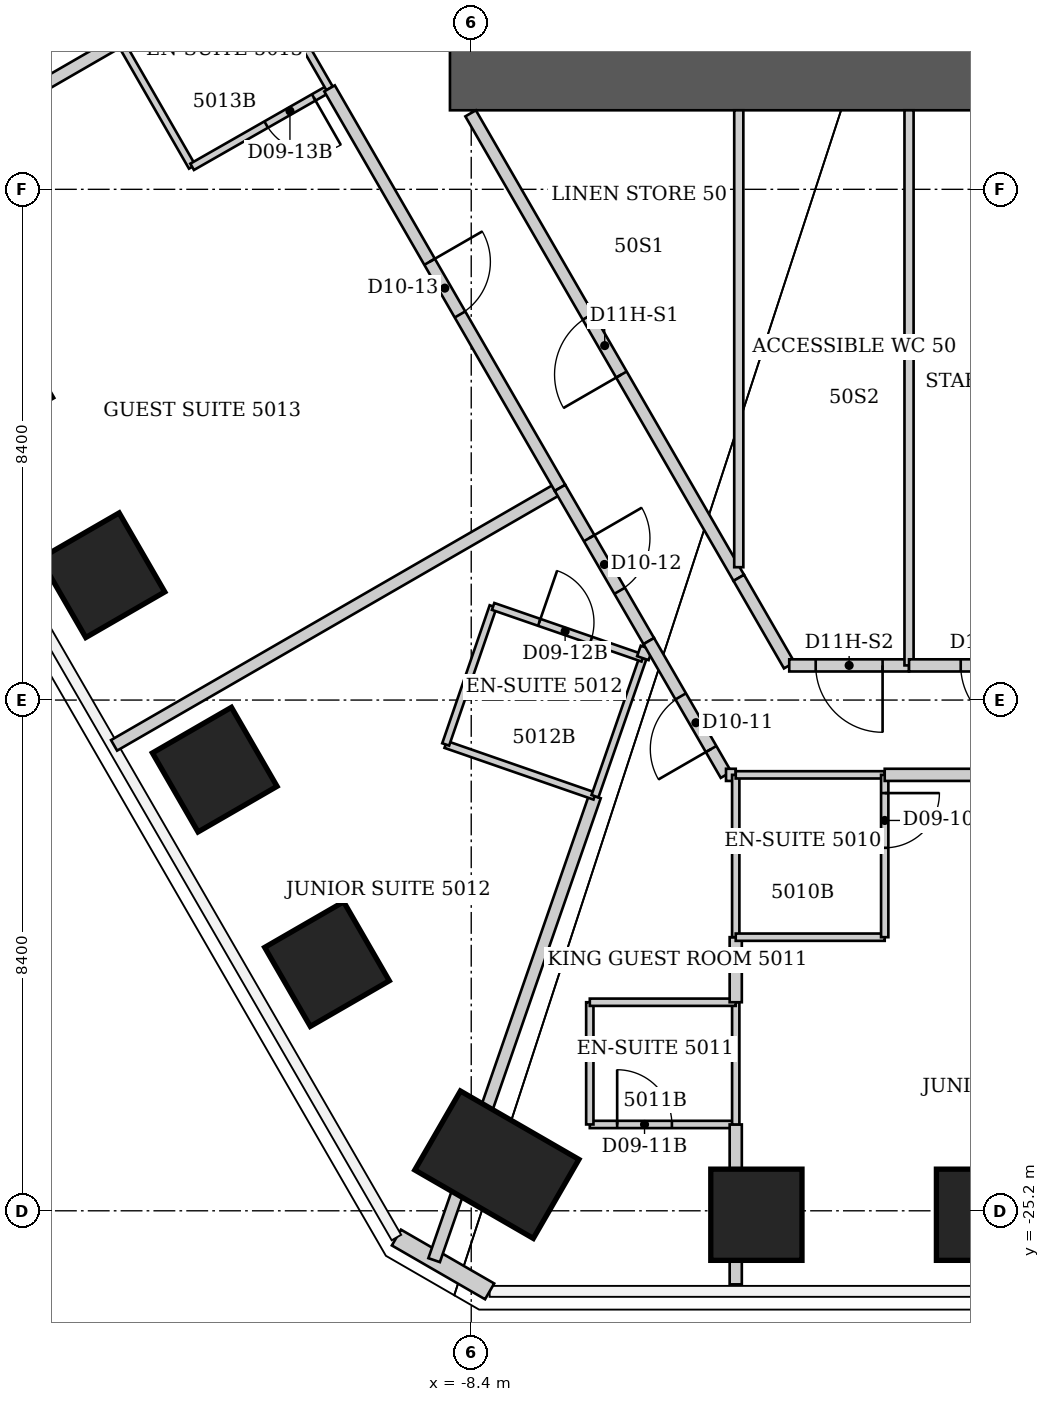
"""IFC4 building model, lengths in metres.
Left out: names, types, materials, properties, quantities, classifications, styles, units other than length and angle.
Written with IfcOpenShell. Run it as: python <this file> out.ifc"""

import sys

from ifc_helpers import new_model, si_unit, direction, frame, frame_2d, origin, origin_2d, place, context, subcontext, project, spatial, rectangle, extrude, element, fill, save


model = new_model("IFC4")
c1 = context("Model", 3, precision=1e-05, world=origin(), true_north=direction((0.0, 1.0)))
c2 = subcontext(c1, "Body", "Model", "MODEL_VIEW")
j1 = project(units=[si_unit("LENGTHUNIT", "METRE"), si_unit("PLANEANGLEUNIT", "RADIAN")], contexts=[c1])
p1 = place(None, origin())
s1 = spatial("IfcSite", under=j1, at=p1, CompositionType="ELEMENT")
p2 = place(p1, origin())
s2 = spatial("IfcBuilding", under=s1, at=p2, CompositionType="ELEMENT")
p3 = place(p2, frame((0.0, 0.0, 202.2)))
s3 = spatial("IfcBuildingStorey", under=s2, at=p3, CompositionType="ELEMENT", Elevation=202.2)
for number, where, z_axis, x_axis in (
    (1, (0.0, -25.265, 0.0), (0.0, 0.0, 1.0), (0.0, -1.0, 0.0)),
    (2, (-3.71, -25.265, 0.0), (0.0, 0.0, 1.0), (0.0, -1.0, 0.0)),
):
    element("IfcColumn", number, at=place(p3, frame(where, z_axis=z_axis, x_axis=x_axis)), inside=s3, PredefinedType="COLUMN", context=c2, shape_type="SweptSolid", body=[
        extrude(rectangle(XDim=1.5, YDim=1.5, at=origin_2d()), origin(), (0.0, 0.0, 1.0), 3.8),
    ])
p4 = place(p3, frame((-7.979, -24.442, 0.0), z_axis=(0.0, 0.0, 1.0), x_axis=(-0.5, -0.866025403784, 0.0)))
e3 = element("IfcColumn", 3, at=p4, inside=s3, PredefinedType="COLUMN", context=c2, shape_type="SweptSolid", body=[
    extrude(rectangle(XDim=1.5, YDim=2.25, at=origin_2d()), origin(), (0.0, 0.0, 1.0), 3.8),
])
for number, where, z_axis, x_axis in (
    (4, (-10.772, -21.142, 0.0), (0.0, 0.0, 1.0), (-0.866, -0.5, 0.0)),
    (5, (-12.618, -17.945, 0.0), (0.0, 0.0, 1.0), (-0.866, -0.5, 0.0)),
    (6, (-14.465, -14.747, 0.0), (0.0, 0.0, 1.0), (-0.866, -0.5, 0.0)),
    (7, (-16.311, -11.549, 0.0), (0.0, 0.0, 1.0), (-0.866, -0.5, 0.0)),
):
    element("IfcColumn", number, at=place(p3, frame(where, z_axis=z_axis, x_axis=x_axis)), inside=s3, PredefinedType="COLUMN", context=c2, shape_type="SweptSolid", body=[
        extrude(rectangle(XDim=1.5, YDim=1.5, at=origin_2d()), origin(), (0.0, 0.0, 1.0), 3.8),
    ])
p5 = place(p3, frame((-8.75, -6.6, 0.0), z_axis=(0.0, 0.0, 1.0), x_axis=(1.0, 0.0, 0.0)))
e8 = element("IfcWall", 8, at=p5, inside=s3, PredefinedType="SHEAR", context=c2, shape_type="SweptSolid", body=[
    extrude(rectangle(XDim=17.5, YDim=1.0, at=frame_2d((8.75, 0.0))), origin(), (0.0, 0.0, 1.0), 3.8),
])
p6 = place(p3, frame((-8.097, -26.525, 0.0), z_axis=(0.0, 0.0, 1.0), x_axis=(-0.866036293601, 0.499981137809, 0.0)))
e9 = element("IfcWall", 9, at=p6, inside=s3, PredefinedType="SOLIDWALL", context=c2, shape_type="SweptSolid", body=[
    extrude(rectangle(XDim=1.77, YDim=0.3, at=frame_2d((0.885, 0.0))), origin(), (0.0, 0.0, 1.0), 3.64),
])
p7 = place(p3, frame((-19.186, -8.85, 0.0), z_axis=(0.0, 0.0, 1.0), x_axis=(0.866035778077, 0.499982030767, 0.0)))
e10 = element("IfcWall", 10, at=p7, inside=s3, PredefinedType="PARTITIONING", context=c2, shape_type="SweptSolid", body=[
    extrude(rectangle(XDim=5.781, YDim=0.2, at=frame_2d((2.89, 0.0))), origin(), (0.0, 0.0, 1.0), 3.038),
])
p8 = place(p3, frame((-14.274, -17.545, 0.0), z_axis=(0.0, 0.0, 1.0), x_axis=(0.865985626634, 0.500068889717, 0.0)))
e11 = element("IfcWall", 11, at=p8, inside=s3, PredefinedType="PARTITIONING", context=c2, shape_type="SweptSolid", body=[
    extrude(rectangle(XDim=8.459, YDim=0.2, at=frame_2d((4.229, 0.0))), origin(), (0.0, 0.0, 1.0), 3.64),
])
p9 = place(p3, frame((-14.18, -5.96, 0.0), z_axis=(0.0, 0.0, 1.0), x_axis=(0.49836161924, -0.866969259241, 0.0)))
e12 = element("IfcWall", 12, at=p9, inside=s3, PredefinedType="PARTITIONING", context=c2, shape_type="SweptSolid", body=[
    extrude(rectangle(XDim=2.388, YDim=0.12, at=frame_2d((1.194, 0.0))), origin(), (0.0, 0.0, 1.0), 3.64),
])
p10 = place(p3, frame((-12.99, -8.03, 0.0), z_axis=(0.0, 0.0, 1.0), x_axis=(0.868473984885, 0.49573474518, 0.0)))
e13 = element("IfcWall", 13, at=p10, inside=s3, PredefinedType="PARTITIONING", context=c2, shape_type="SweptSolid", body=[
    extrude(rectangle(XDim=2.602, YDim=0.12, at=frame_2d((1.301, 0.0))), origin(), (0.0, 0.0, 1.0), 3.64),
])
p11 = place(p10, frame((1.402, 0.0, 0.0)))
e14 = element("IfcOpeningElement", 14, at=p11, cuts=e13, PredefinedType="OPENING", context=c2, shape_type="SweptSolid", body=[
    extrude(rectangle(XDim=0.9, YDim=2.03, at=frame_2d((0.45, 1.015))), frame((0.0, 0.06, 0.0), z_axis=(0.0, -1.0, 0.0), x_axis=(1.0, 0.0, 0.0)), (0.0, 0.0, 1.0), 0.12),
])
p12 = place(p3, frame((-11.93, -4.66, 0.0), z_axis=(0.0, 0.0, 1.0), x_axis=(0.499693115345, -0.866202511239, 0.0)))
e15 = element("IfcWall", 15, at=p12, inside=s3, PredefinedType="PARTITIONING", context=c2, shape_type="SweptSolid", body=[
    extrude(rectangle(XDim=2.401, YDim=0.12, at=frame_2d((1.201, 0.0))), origin(), (0.0, 0.0, 1.0), 3.64),
])
p13 = place(p3, frame((-10.73, -6.74, 0.0), z_axis=(0.0, 0.0, 1.0), x_axis=(0.499684370586, -0.866207555839, 0.0)))
e16 = element("IfcWall", 16, at=p13, inside=s3, PredefinedType="PARTITIONING", context=c2, shape_type="SweptSolid", body=[
    extrude(rectangle(XDim=7.585, YDim=0.2, at=frame_2d((3.792, 0.0))), origin(), (0.0, 0.0, 1.0), 3.64),
])
p14 = place(p13, frame((3.292, 0.0, 0.0)))
e17 = element("IfcOpeningElement", 17, at=p14, cuts=e16, PredefinedType="OPENING", context=c2, shape_type="SweptSolid", body=[
    extrude(rectangle(XDim=1.0, YDim=2.13, at=frame_2d((0.5, 1.065))), frame((0.0, 0.1, 0.0), z_axis=(0.0, -1.0, 0.0), x_axis=(1.0, 0.0, 0.0)), (0.0, 0.0, 1.0), 0.2),
])
p15 = place(p3, frame((-9.01, -26.012, 0.0), z_axis=(0.0, 0.0, 1.0), x_axis=(0.32759647282, 0.944817734272, 0.0)))
e18 = element("IfcWall", 18, at=p15, inside=s3, PredefinedType="PARTITIONING", context=c2, shape_type="SweptSolid", body=[
    extrude(rectangle(XDim=8.075, YDim=0.2, at=frame_2d((4.038, 0.0))), origin(), (0.0, 0.0, 1.0), 3.64),
])
p16 = place(p3, frame((-8.82, -17.53, 0.0), z_axis=(0.0, 0.0, 1.0), x_axis=(0.944753042377, -0.327782990589, 0.0)))
e19 = element("IfcWall", 19, at=p16, inside=s3, PredefinedType="PARTITIONING", context=c2, shape_type="SweptSolid", body=[
    extrude(rectangle(XDim=2.594, YDim=0.12, at=frame_2d((1.297, 0.0))), origin(), (0.0, 0.0, 1.0), 3.64),
])
p17 = place(p3, frame((-8.04, -15.26, 0.0), z_axis=(0.0, 0.0, 1.0), x_axis=(-0.324971746724, -0.945723724896, 0.0)))
e20 = element("IfcWall", 20, at=p17, inside=s3, PredefinedType="PARTITIONING", context=c2, shape_type="SweptSolid", body=[
    extrude(rectangle(XDim=2.4, YDim=0.12, at=frame_2d((1.2, 0.0))), origin(), (0.0, 0.0, 1.0), 3.64),
])
p18 = place(p3, frame((-6.94, -13.31, 0.0), z_axis=(0.0, 0.0, 1.0), x_axis=(0.501293994647, -0.865277025542, 0.0)))
e21 = element("IfcWall", 21, at=p18, inside=s3, PredefinedType="PARTITIONING", context=c2, shape_type="SweptSolid", body=[
    extrude(rectangle(XDim=2.912, YDim=0.2, at=frame_2d((1.456, 0.0))), origin(), (0.0, 0.0, 1.0), 3.64),
])
p19 = place(p18, frame((0.956, 0.0, 0.0)))
e22 = element("IfcOpeningElement", 22, at=p19, cuts=e21, PredefinedType="OPENING", context=c2, shape_type="SweptSolid", body=[
    extrude(rectangle(XDim=1.0, YDim=2.13, at=frame_2d((0.5, 1.065))), frame((0.0, 0.1, 0.0), z_axis=(0.0, -1.0, 0.0), x_axis=(1.0, 0.0, 0.0)), (0.0, 0.0, 1.0), 0.2),
])
p20 = place(p3, frame((-6.45, -23.78, 0.0), z_axis=(0.0, 0.0, 1.0), x_axis=(1.0, 0.0, 0.0)))
e23 = element("IfcWall", 23, at=p20, inside=s3, PredefinedType="PARTITIONING", context=c2, shape_type="SweptSolid", body=[
    extrude(rectangle(XDim=2.4, YDim=0.12, at=frame_2d((1.2, 0.0))), origin(), (0.0, 0.0, 1.0), 3.64),
])
p21 = place(p20, frame((0.45, 0.0, 0.0)))
e24 = element("IfcOpeningElement", 24, at=p21, cuts=e23, PredefinedType="OPENING", context=c2, shape_type="SweptSolid", body=[
    extrude(rectangle(XDim=0.9, YDim=2.03, at=frame_2d((0.45, 1.015))), frame((0.0, 0.06, 0.0), z_axis=(0.0, -1.0, 0.0), x_axis=(1.0, 0.0, 0.0)), (0.0, 0.0, 1.0), 0.12),
])
p22 = place(p3, frame((-6.45, -21.77, 0.0), z_axis=(0.0, 0.0, 1.0), x_axis=(0.0, -1.0, 0.0)))
e25 = element("IfcWall", 25, at=p22, inside=s3, PredefinedType="PARTITIONING", context=c2, shape_type="SweptSolid", body=[
    extrude(rectangle(XDim=2.01, YDim=0.12, at=frame_2d((1.005, 0.0))), origin(), (0.0, 0.0, 1.0), 3.64),
])
p23 = place(p3, frame((-6.365, -18.382, 0.0), z_axis=(0.0, 0.0, 1.0), x_axis=(0.327571022417, 0.944826558302, 0.0)))
e26 = element("IfcWall", 26, at=p23, inside=s3, PredefinedType="PARTITIONING", context=c2, shape_type="SweptSolid", body=[
    extrude(rectangle(XDim=2.404, YDim=0.12, at=frame_2d((1.202, 0.0))), origin(), (0.0, 0.0, 1.0), 3.64),
])
p24 = place(p3, frame((-5.58, -16.11, 0.0), z_axis=(0.0, 0.0, 1.0), x_axis=(-0.94515546045, 0.326620813149, 0.0)))
e27 = element("IfcWall", 27, at=p24, inside=s3, PredefinedType="PARTITIONING", context=c2, shape_type="SweptSolid", body=[
    extrude(rectangle(XDim=2.603, YDim=0.12, at=frame_2d((1.301, 0.0))), origin(), (0.0, 0.0, 1.0), 3.64),
])
p25 = place(p24, frame((0.9, 0.0, 0.0)))
e28 = element("IfcOpeningElement", 28, at=p25, cuts=e27, PredefinedType="OPENING", context=c2, shape_type="SweptSolid", body=[
    extrude(rectangle(XDim=0.9, YDim=2.03, at=frame_2d((0.45, 1.015))), frame((0.0, 0.06, 0.0), z_axis=(0.0, -1.0, 0.0), x_axis=(1.0, 0.0, 0.0)), (0.0, 0.0, 1.0), 0.12),
])
p26 = place(p3, frame((-5.577, -16.111, 0.0), z_axis=(0.0, 0.0, 1.0), x_axis=(0.328260778463, 0.944587138025, 0.0)))
e29 = element("IfcWall", 29, at=p26, inside=s3, PredefinedType="PARTITIONING", context=c2, shape_type="SweptSolid", body=[
    extrude(rectangle(XDim=0.182, YDim=0.2, at=frame_2d((0.091, 0.0))), origin(), (0.0, 0.0, 1.0), 3.64),
])
p27 = place(p3, frame((-5.48, -15.83, 0.0), z_axis=(0.0, 0.0, 1.0), x_axis=(0.499963722229, -0.866046347752, 0.0)))
e30 = element("IfcWall", 30, at=p27, inside=s3, PredefinedType="PARTITIONING", context=c2, shape_type="SweptSolid", body=[
    extrude(rectangle(XDim=2.54, YDim=0.2, at=frame_2d((1.27, 0.0))), origin(), (0.0, 0.0, 1.0), 3.64),
])
p28 = place(p27, frame((1.05, 0.0, 0.0)))
e31 = element("IfcOpeningElement", 31, at=p28, cuts=e30, PredefinedType="OPENING", context=c2, shape_type="SweptSolid", body=[
    extrude(rectangle(XDim=1.0, YDim=2.13, at=frame_2d((0.5, 1.065))), frame((0.0, 0.1, 0.0), z_axis=(0.0, -1.0, 0.0), x_axis=(1.0, 0.0, 0.0)), (0.0, 0.0, 1.0), 0.2),
])
p29 = place(p3, frame((-4.21, -18.03, 0.0), z_axis=(0.0, 0.0, 1.0), x_axis=(1.0, 0.0, 0.0)))
e32 = element("IfcWall", 32, at=p29, inside=s3, PredefinedType="PARTITIONING", context=c2, shape_type="SweptSolid", body=[
    extrude(rectangle(XDim=0.16, YDim=0.2, at=frame_2d((0.08, 0.0))), origin(), (0.0, 0.0, 1.0), 3.64),
])
p30 = place(p3, frame((-4.05, -26.41, 0.0), z_axis=(0.0, 0.0, 1.0), x_axis=(0.0, 1.0, 0.0)))
e33 = element("IfcWall", 33, at=p30, inside=s3, PredefinedType="PARTITIONING", context=c2, shape_type="SweptSolid", body=[
    extrude(rectangle(XDim=2.63, YDim=0.2, at=frame_2d((1.315, 0.0))), origin(), (0.0, 0.0, 1.0), 3.64),
])
p31 = place(p3, frame((-4.05, -23.78, 0.0), z_axis=(0.0, 0.0, 1.0), x_axis=(0.0, 1.0, 0.0)))
e34 = element("IfcWall", 34, at=p31, inside=s3, PredefinedType="PARTITIONING", context=c2, shape_type="SweptSolid", body=[
    extrude(rectangle(XDim=2.01, YDim=0.12, at=frame_2d((1.005, 0.0))), origin(), (0.0, 0.0, 1.0), 3.64),
])
p32 = place(p3, frame((-4.05, -21.77, 0.0), z_axis=(0.0, 0.0, 1.0), x_axis=(-1.0, 0.0, 0.0)))
e35 = element("IfcWall", 35, at=p32, inside=s3, PredefinedType="PARTITIONING", context=c2, shape_type="SweptSolid", body=[
    extrude(rectangle(XDim=2.4, YDim=0.12, at=frame_2d((1.2, 0.0))), origin(), (0.0, 0.0, 1.0), 3.64),
])
p33 = place(p3, frame((-4.05, -21.77, 0.0), z_axis=(0.0, 0.0, 1.0), x_axis=(0.0, 1.0, 0.0)))
e36 = element("IfcWall", 36, at=p33, inside=s3, PredefinedType="PARTITIONING", context=c2, shape_type="SweptSolid", body=[
    extrude(rectangle(XDim=1.07, YDim=0.2, at=frame_2d((0.535, 0.0))), origin(), (0.0, 0.0, 1.0), 3.64),
])
p34 = place(p3, frame((-4.05, -20.7, 0.0), z_axis=(0.0, 0.0, 1.0), x_axis=(0.0, 1.0, 0.0)))
e37 = element("IfcWall", 37, at=p34, inside=s3, PredefinedType="PARTITIONING", context=c2, shape_type="SweptSolid", body=[
    extrude(rectangle(XDim=2.67, YDim=0.12, at=frame_2d((1.335, 0.0))), origin(), (0.0, 0.0, 1.0), 3.64),
])
for number, where, z_axis, x_axis in (
    (38, (-4.05, -20.7, 0.0), (0.0, 0.0, 1.0), (1.0, 0.0, 0.0)),
    (39, (-4.05, -18.03, 0.0), (0.0, 0.0, 1.0), (1.0, 0.0, 0.0)),
):
    element("IfcWall", number, at=place(p3, frame(where, z_axis=z_axis, x_axis=x_axis)), inside=s3, PredefinedType="PARTITIONING", context=c2, shape_type="SweptSolid", body=[
        extrude(rectangle(XDim=2.45, YDim=0.12, at=frame_2d((1.225, 0.0))), origin(), (0.0, 0.0, 1.0), 3.64),
    ])
p35 = place(p3, frame((-4.0, -14.79, 0.0), z_axis=(0.0, 0.0, 1.0), x_axis=(-0.499916512745, 0.866073599808, 0.0)))
e40 = element("IfcWall", 40, at=p35, inside=s3, PredefinedType="PARTITIONING", context=c2, shape_type="SweptSolid", body=[
    extrude(rectangle(XDim=8.821, YDim=0.2, at=frame_2d((4.411, 0.0))), origin(), (0.0, 0.0, 1.0), 3.64),
])
p36 = place(p35, frame((3.861, 0.0, 0.0)))
e41 = element("IfcOpeningElement", 41, at=p36, cuts=e40, PredefinedType="OPENING", context=c2, shape_type="SweptSolid", body=[
    extrude(rectangle(XDim=1.1, YDim=2.2, at=frame_2d((0.55, 1.1))), frame((0.0, 0.1, 0.0), z_axis=(0.0, -1.0, 0.0), x_axis=(1.0, 0.0, 0.0)), (0.0, 0.0, 1.0), 0.2),
])
p37 = place(p3, frame((-4.0, -7.1, 0.0), z_axis=(0.0, 0.0, 1.0), x_axis=(0.0, -1.0, 0.0)))
e42 = element("IfcWall", 42, at=p37, inside=s3, PredefinedType="PARTITIONING", context=c2, shape_type="SweptSolid", body=[
    extrude(rectangle(XDim=7.515, YDim=0.15, at=frame_2d((3.757, 0.0))), origin(), (0.0, 0.0, 1.0), 3.64),
])
p38 = place(p3, frame((-3.17, -16.23, 0.0), z_axis=(0.0, 0.0, 1.0), x_axis=(-0.499425709803, 0.866356716594, 0.0)))
e43 = element("IfcWall", 43, at=p38, inside=s3, PredefinedType="PARTITIONING", context=c2, shape_type="SweptSolid", body=[
    extrude(rectangle(XDim=1.662, YDim=0.2, at=frame_2d((0.831, 0.0))), origin(), (0.0, 0.0, 1.0), 3.64),
])
p39 = place(p3, frame((-1.6, -20.7, 0.0), z_axis=(0.0, 0.0, 1.0), x_axis=(0.0, 1.0, 0.0)))
e44 = element("IfcWall", 44, at=p39, inside=s3, PredefinedType="PARTITIONING", context=c2, shape_type="SweptSolid", body=[
    extrude(rectangle(XDim=2.67, YDim=0.12, at=frame_2d((1.335, 0.0))), origin(), (0.0, 0.0, 1.0), 3.64),
])
p40 = place(p39, frame((1.47, 0.0, 0.0)))
e45 = element("IfcOpeningElement", 45, at=p40, cuts=e44, PredefinedType="OPENING", context=c2, shape_type="SweptSolid", body=[
    extrude(rectangle(XDim=0.9, YDim=2.03, at=frame_2d((0.45, 1.015))), frame((0.0, 0.06, 0.0), z_axis=(0.0, -1.0, 0.0), x_axis=(1.0, 0.0, 0.0)), (0.0, 0.0, 1.0), 0.12),
])
p41 = place(p3, frame((-1.6, -18.03, 0.0), z_axis=(0.0, 0.0, 1.0), x_axis=(1.0, 0.0, 0.0)))
e46 = element("IfcWall", 46, at=p41, inside=s3, PredefinedType="PARTITIONING", context=c2, shape_type="SweptSolid", body=[
    extrude(rectangle(XDim=5.65, YDim=0.2, at=frame_2d((2.825, 0.0))), origin(), (0.0, 0.0, 1.0), 3.64),
])
p42 = place(p41, frame((2.325, 0.0, 0.0)))
e47 = element("IfcOpeningElement", 47, at=p42, cuts=e46, PredefinedType="OPENING", context=c2, shape_type="SweptSolid", body=[
    extrude(rectangle(XDim=1.0, YDim=2.13, at=frame_2d((0.5, 1.065))), frame((0.0, 0.1, 0.0), z_axis=(0.0, -1.0, 0.0), x_axis=(1.0, 0.0, 0.0)), (0.0, 0.0, 1.0), 0.2),
])
p43 = place(p3, frame((-1.2, -16.23, 0.0), z_axis=(0.0, 0.0, 1.0), x_axis=(-1.0, 0.0, 0.0)))
e48 = element("IfcWall", 48, at=p43, inside=s3, PredefinedType="PARTITIONING", context=c2, shape_type="SweptSolid", body=[
    extrude(rectangle(XDim=1.97, YDim=0.2, at=frame_2d((0.985, 0.0))), origin(), (0.0, 0.0, 1.0), 3.64),
])
p44 = place(p43, frame((0.435, 0.0, 0.0)))
e49 = element("IfcOpeningElement", 49, at=p44, cuts=e48, PredefinedType="OPENING", context=c2, shape_type="SweptSolid", body=[
    extrude(rectangle(XDim=1.1, YDim=2.2, at=frame_2d((0.55, 1.1))), frame((0.0, 0.1, 0.0), z_axis=(0.0, -1.0, 0.0), x_axis=(1.0, 0.0, 0.0)), (0.0, 0.0, 1.0), 0.2),
])
p45 = place(p3, frame((-1.2, -7.1, 0.0), z_axis=(0.0, 0.0, 1.0), x_axis=(0.0, -1.0, 0.0)))
e50 = element("IfcWall", 50, at=p45, inside=s3, PredefinedType="PARTITIONING", context=c2, shape_type="SweptSolid", body=[
    extrude(rectangle(XDim=9.13, YDim=0.15, at=frame_2d((4.565, 0.0))), origin(), (0.0, 0.0, 1.0), 3.64),
])
p46 = place(p3, frame((1.6, -16.23, 0.0), z_axis=(0.0, 0.0, 1.0), x_axis=(-1.0, 0.0, 0.0)))
e51 = element("IfcWall", 51, at=p46, inside=s3, PredefinedType="PARTITIONING", context=c2, shape_type="SweptSolid", body=[
    extrude(rectangle(XDim=2.8, YDim=0.2, at=frame_2d((1.4, 0.0))), origin(), (0.0, 0.0, 1.0), 3.64),
])
p47 = place(p46, frame((0.85, 0.0, 0.0)))
e52 = element("IfcOpeningElement", 52, at=p47, cuts=e51, PredefinedType="OPENING", context=c2, shape_type="SweptSolid", body=[
    extrude(rectangle(XDim=1.1, YDim=2.2, at=frame_2d((0.55, 1.1))), frame((0.0, 0.1, 0.0), z_axis=(0.0, -1.0, 0.0), x_axis=(1.0, 0.0, 0.0)), (0.0, 0.0, 1.0), 0.2),
])
p48 = place(p40, origin())
e53 = element("IfcDoor", 53, at=p48, inside=s3, OperationType="SINGLE_SWING_RIGHT", PredefinedType="DOOR", context=c2, shape_type="SweptSolid", body=[
    extrude(rectangle(XDim=0.9, YDim=2.03, at=frame_2d((0.45, 1.015))), frame((0.0, 0.025, 0.0), z_axis=(0.0, -1.0, 0.0), x_axis=(1.0, 0.0, 0.0)), (0.0, 0.0, 1.0), 0.05),
])
fill(e45, e53)
p49 = place(p28, origin())
e54 = element("IfcDoor", 54, at=p49, inside=s3, OperationType="SINGLE_SWING_RIGHT", PredefinedType="DOOR", context=c2, shape_type="SweptSolid", body=[
    extrude(rectangle(XDim=1.0, YDim=2.13, at=frame_2d((0.5, 1.065))), frame((0.0, 0.025, 0.0), z_axis=(0.0, -1.0, 0.0), x_axis=(1.0, 0.0, 0.0)), (0.0, 0.0, 1.0), 0.05),
])
fill(e31, e54)
p50 = place(p21, origin())
e55 = element("IfcDoor", 55, at=p50, inside=s3, OperationType="SINGLE_SWING_LEFT", PredefinedType="DOOR", context=c2, shape_type="SweptSolid", body=[
    extrude(rectangle(XDim=0.9, YDim=2.03, at=frame_2d((0.45, 1.015))), frame((0.0, 0.025, 0.0), z_axis=(0.0, -1.0, 0.0), x_axis=(1.0, 0.0, 0.0)), (0.0, 0.0, 1.0), 0.05),
])
fill(e24, e55)
p51 = place(p19, origin())
e56 = element("IfcDoor", 56, at=p51, inside=s3, OperationType="SINGLE_SWING_LEFT", PredefinedType="DOOR", context=c2, shape_type="SweptSolid", body=[
    extrude(rectangle(XDim=1.0, YDim=2.13, at=frame_2d((0.5, 1.065))), frame((0.0, 0.025, 0.0), z_axis=(0.0, -1.0, 0.0), x_axis=(1.0, 0.0, 0.0)), (0.0, 0.0, 1.0), 0.05),
])
fill(e22, e56)
p52 = place(p25, origin())
e57 = element("IfcDoor", 57, at=p52, inside=s3, OperationType="SINGLE_SWING_RIGHT", PredefinedType="DOOR", context=c2, shape_type="SweptSolid", body=[
    extrude(rectangle(XDim=0.9, YDim=2.03, at=frame_2d((0.45, 1.015))), frame((0.0, 0.025, 0.0), z_axis=(0.0, -1.0, 0.0), x_axis=(1.0, 0.0, 0.0)), (0.0, 0.0, 1.0), 0.05),
])
fill(e28, e57)
p53 = place(p14, origin())
e58 = element("IfcDoor", 58, at=p53, inside=s3, OperationType="SINGLE_SWING_LEFT", PredefinedType="DOOR", context=c2, shape_type="SweptSolid", body=[
    extrude(rectangle(XDim=1.0, YDim=2.13, at=frame_2d((0.5, 1.065))), frame((0.0, 0.025, 0.0), z_axis=(0.0, -1.0, 0.0), x_axis=(1.0, 0.0, 0.0)), (0.0, 0.0, 1.0), 0.05),
])
fill(e17, e58)
p54 = place(p11, origin())
e59 = element("IfcDoor", 59, at=p54, inside=s3, OperationType="SINGLE_SWING_RIGHT", PredefinedType="DOOR", context=c2, shape_type="SweptSolid", body=[
    extrude(rectangle(XDim=0.9, YDim=2.03, at=frame_2d((0.45, 1.015))), frame((0.0, 0.025, 0.0), z_axis=(0.0, -1.0, 0.0), x_axis=(1.0, 0.0, 0.0)), (0.0, 0.0, 1.0), 0.05),
])
fill(e14, e59)
p55 = place(p36, origin())
e60 = element("IfcDoor", 60, at=p55, inside=s3, OperationType="SINGLE_SWING_LEFT", PredefinedType="DOOR", context=c2, shape_type="SweptSolid", body=[
    extrude(rectangle(XDim=1.1, YDim=2.2, at=frame_2d((0.55, 1.1))), frame((0.0, 0.025, 0.0), z_axis=(0.0, -1.0, 0.0), x_axis=(1.0, 0.0, 0.0)), (0.0, 0.0, 1.0), 0.05),
])
fill(e41, e60)
p56 = place(p44, origin())
e61 = element("IfcDoor", 61, at=p56, inside=s3, OperationType="SINGLE_SWING_LEFT", PredefinedType="DOOR", context=c2, shape_type="SweptSolid", body=[
    extrude(rectangle(XDim=1.1, YDim=2.2, at=frame_2d((0.55, 1.1))), frame((0.0, 0.025, 0.0), z_axis=(0.0, -1.0, 0.0), x_axis=(1.0, 0.0, 0.0)), (0.0, 0.0, 1.0), 0.05),
])
fill(e49, e61)
p57 = place(p47, origin())
e62 = element("IfcDoor", 62, at=p57, inside=s3, OperationType="SINGLE_SWING_LEFT", PredefinedType="DOOR", context=c2, shape_type="SweptSolid", body=[
    extrude(rectangle(XDim=1.1, YDim=2.2, at=frame_2d((0.55, 1.1))), frame((0.0, 0.025, 0.0), z_axis=(0.0, -1.0, 0.0), x_axis=(1.0, 0.0, 0.0)), (0.0, 0.0, 1.0), 0.05),
])
fill(e52, e62)
save(model, sys.argv[1])
